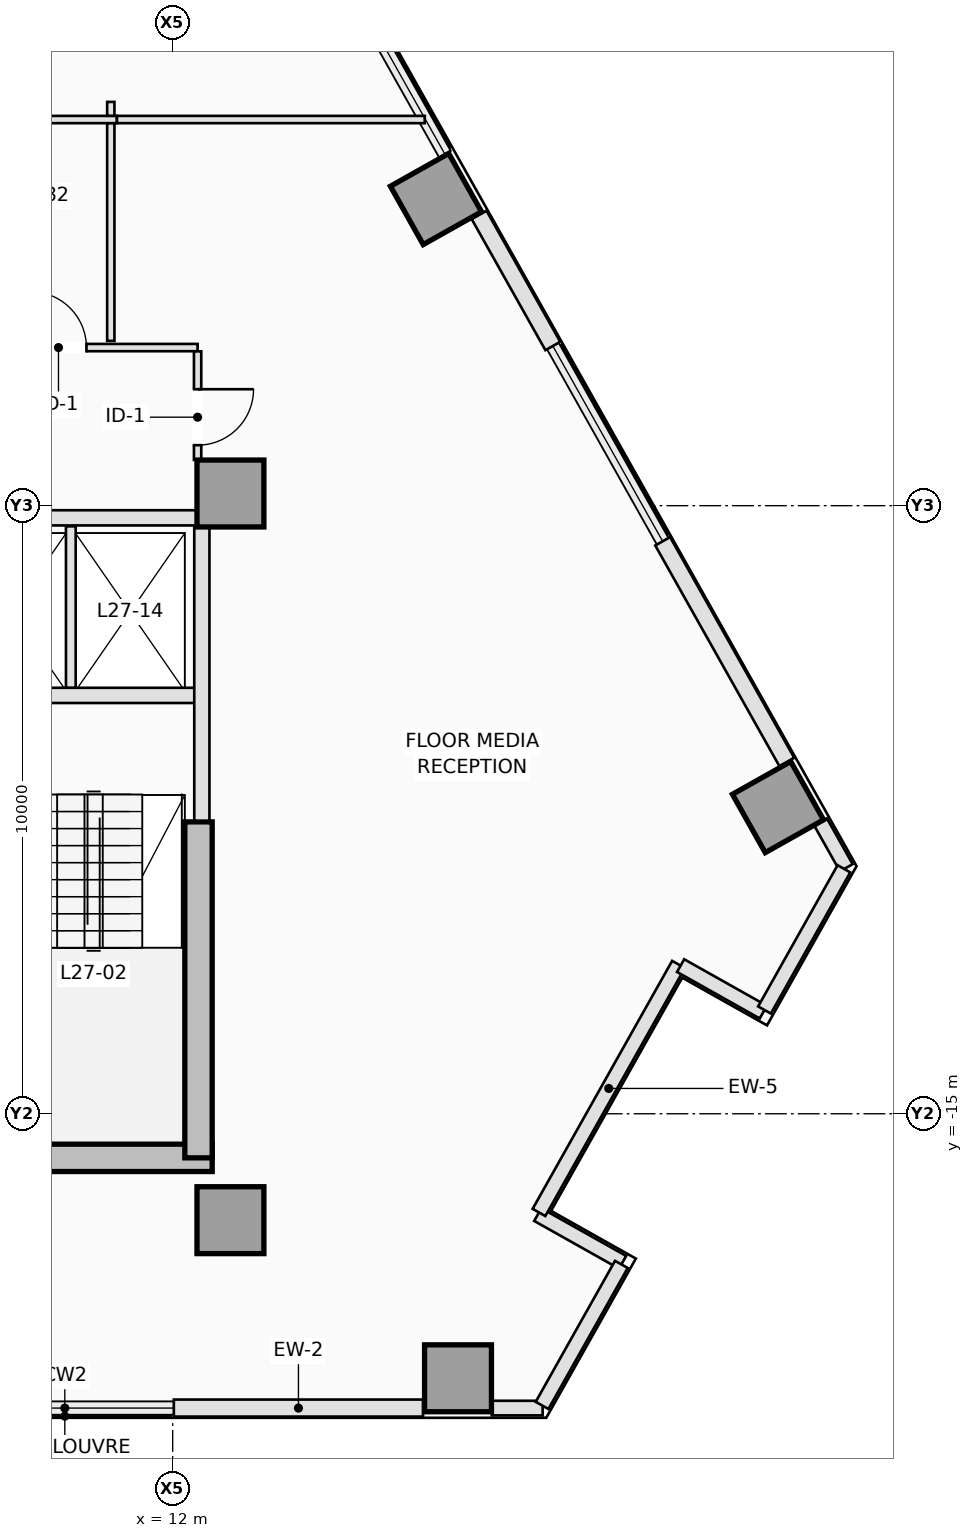
"""IFC4 building model, lengths in metres.
Left out: names, types, materials, properties, quantities, classifications, styles, units other than length and angle.
Written with IfcOpenShell. Run it as: python <this file> out.ifc"""

import sys

from ifc_helpers import new_model, si_unit, direction, frame, frame_2d, origin, origin_2d, place, context, subcontext, project, spatial, rectangle, extrude, element, fill, save


model = new_model("IFC4")
c1 = context("Model", 3, precision=1e-05, world=origin(), true_north=direction((0.0, 1.0)))
c2 = subcontext(c1, "Body", "Model", "MODEL_VIEW")
j1 = project(units=[si_unit("LENGTHUNIT", "METRE"), si_unit("PLANEANGLEUNIT", "RADIAN")], contexts=[c1])
p1 = place(None, origin())
s1 = spatial("IfcSite", under=j1, at=p1, CompositionType="ELEMENT")
p2 = place(p1, origin())
s2 = spatial("IfcBuilding", under=s1, at=p2, CompositionType="ELEMENT")
p3 = place(p2, frame((0.0, 0.0, 102.0)))
s3 = spatial("IfcBuildingStorey", under=s2, at=p3, CompositionType="ELEMENT", Elevation=102.0)
p4 = place(p3, frame((8.75, -15.725, 0.0), z_axis=(0.0, 0.0, 1.0), x_axis=(1.0, 0.0, 0.0)))
e1 = element("IfcWall", 1, at=p4, inside=s3, PredefinedType="SHEAR", context=c2, shape_type="SweptSolid", body=[
    extrude(rectangle(XDim=3.9, YDim=0.45, at=frame_2d((1.95, 0.0))), origin(), (0.0, 0.0, 1.0), 3.5),
])
p5 = place(p3, frame((12.425, -15.725, 0.0), z_axis=(0.0, 0.0, 1.0), x_axis=(0.0, 1.0, 0.0)))
e2 = element("IfcWall", 2, at=p5, inside=s3, PredefinedType="SHEAR", context=c2, shape_type="SweptSolid", body=[
    extrude(rectangle(XDim=5.525, YDim=0.45, at=frame_2d((2.763, 0.0))), origin(), (0.0, 0.0, 1.0), 3.5),
])
for number, where, z_axis, x_axis in (
    (3, (12.95, -16.75, 0.0), (0.0, 0.0, 1.0), (1.0, 0.0, 0.0)),
    (4, (12.95, -4.8, 0.0), (0.0, 0.0, 1.0), (1.0, 0.0, 0.0)),
    (5, (16.692, -19.35, 0.0), (0.0, 0.0, 1.0), (0.0, 1.0, 0.0)),
    (6, (21.955, -9.957, 0.0), (0.0, 0.0, 1.0), (0.872, 0.49, 0.0)),
    (7, (16.33, 0.043, 0.0), (0.0, 0.0, 1.0), (0.872, 0.49, 0.0)),
):
    element("IfcColumn", number, at=place(p3, frame(where, z_axis=z_axis, x_axis=x_axis)), inside=s3, PredefinedType="COLUMN", context=c2, shape_type="SweptSolid", body=[
        extrude(rectangle(XDim=1.1, YDim=1.1, at=origin_2d()), origin(), (0.0, 0.0, 1.0), 3.5),
    ])
p6 = place(p3, frame((18.084, -19.84, 0.0), z_axis=(0.0, 0.0, 1.0), x_axis=(-1.0, 0.0, 0.0)))
e8 = element("IfcWall", 8, at=p6, inside=s3, PredefinedType="STANDARD", context=c2, shape_type="SweptSolid", body=[
    extrude(rectangle(XDim=0.836, YDim=0.24, at=frame_2d((0.418, 0.0))), origin(), (0.0, 0.0, 1.0), 3.25),
])
p7 = place(p3, frame((16.117, -19.84, 0.0), z_axis=(0.0, 0.0, 1.0), x_axis=(-1.0, 0.0, 0.0)))
e9 = element("IfcWall", 9, at=p7, inside=s3, PredefinedType="STANDARD", context=c2, shape_type="SweptSolid", body=[
    extrude(rectangle(XDim=4.098, YDim=0.28, at=frame_2d((2.049, 0.0))), origin(), (0.0, 0.0, 1.0), 3.25),
])
p8 = place(p3, frame((22.654, -10.2, 0.0), z_axis=(0.0, 0.0, 1.0), x_axis=(0.490355003566, -0.871522788272, 0.0)))
e10 = element("IfcWall", 10, at=p8, inside=s3, PredefinedType="STANDARD", context=c2, shape_type="SweptSolid", body=[
    extrude(rectangle(XDim=0.865, YDim=0.24, at=frame_2d((0.433, 0.0))), origin(), (0.0, 0.0, 1.0), 3.25),
])
p9 = place(p3, frame((17.039, -0.218, 0.0), z_axis=(0.0, 0.0, 1.0), x_axis=(0.490186269625, -0.871617703509, 0.0)))
e11 = element("IfcWall", 11, at=p9, inside=s3, PredefinedType="STANDARD", context=c2, shape_type="SweptSolid", body=[
    extrude(rectangle(XDim=2.474, YDim=0.28, at=frame_2d((1.237, 0.0))), origin(), (0.0, 0.0, 1.0), 3.25),
])
p10 = place(p3, frame((20.058, -5.586, 0.0), z_axis=(0.0, 0.0, 1.0), x_axis=(0.490255672477, -0.871578668626, 0.0)))
e12 = element("IfcWall", 12, at=p10, inside=s3, PredefinedType="STANDARD", context=c2, shape_type="SweptSolid", body=[
    extrude(rectangle(XDim=4.164, YDim=0.28, at=frame_2d((2.082, 0.0))), origin(), (0.0, 0.0, 1.0), 3.25),
])
p11 = place(p3, frame((19.399, -17.442, 0.0), z_axis=(0.0, 0.0, 1.0), x_axis=(-0.871575537125, 0.490261239633, 0.0)))
e13 = element("IfcWall", 13, at=p11, inside=s3, PredefinedType="STANDARD", context=c2, shape_type="SweptSolid", body=[
    extrude(rectangle(XDim=1.6, YDim=0.24, at=frame_2d((0.8, 0.0))), origin(), (0.0, 0.0, 1.0), 3.25),
])
p12 = place(p3, frame((18.024, -16.623, 0.0), z_axis=(0.0, 0.0, 1.0), x_axis=(0.490273623647, 0.871568571001, 0.0)))
e14 = element("IfcWall", 14, at=p12, inside=s3, PredefinedType="STANDARD", context=c2, shape_type="SweptSolid", body=[
    extrude(rectangle(XDim=4.68, YDim=0.24, at=frame_2d((2.34, 0.0))), origin(), (0.0, 0.0, 1.0), 2.722),
])
p13 = place(p3, frame((20.354, -12.564, 0.0), z_axis=(0.0, 0.0, 1.0), x_axis=(0.871546278971, -0.490313250496, 0.0)))
e15 = element("IfcWall", 15, at=p13, inside=s3, PredefinedType="STANDARD", context=c2, shape_type="SweptSolid", body=[
    extrude(rectangle(XDim=1.56, YDim=0.24, at=frame_2d((0.78, 0.0))), origin(), (0.0, 0.0, 1.0), 3.25),
])
p14 = place(p3, frame((21.733, -13.294, 0.0), z_axis=(0.0, 0.0, 1.0), x_axis=(0.490265590412, 0.871573089797, 0.0)))
e16 = element("IfcWall", 16, at=p14, inside=s3, PredefinedType="STANDARD", context=c2, shape_type="SweptSolid", body=[
    extrude(rectangle(XDim=2.664, YDim=0.24, at=frame_2d((1.332, 0.0))), origin(), (0.0, 0.0, 1.0), 3.25),
])
p15 = place(p3, frame((18.075, -19.796, 0.0), z_axis=(0.0, 0.0, 1.0), x_axis=(0.490248170584, 0.871582888335, 0.0)))
e17 = element("IfcWall", 17, at=p15, inside=s3, PredefinedType="STANDARD", context=c2, shape_type="SweptSolid", body=[
    extrude(rectangle(XDim=2.661, YDim=0.24, at=frame_2d((1.331, 0.0))), origin(), (0.0, 0.0, 1.0), 3.25),
])
p16 = place(p3, frame((9.16, -8.12, 0.0), z_axis=(0.0, 0.0, 1.0), x_axis=(1.0, 0.0, 0.0)))
e18 = element("IfcWall", 18, at=p16, inside=s3, PredefinedType="PARTITIONING", context=c2, shape_type="SweptSolid", body=[
    extrude(rectangle(XDim=3.22, YDim=0.25, at=frame_2d((1.61, 0.0))), origin(), (0.0, 0.0, 1.0), 3.25),
])
p17 = place(p3, frame((12.48, -10.18, 0.0), z_axis=(0.0, 0.0, 1.0), x_axis=(0.0, 1.0, 0.0)))
e19 = element("IfcWall", 19, at=p17, inside=s3, PredefinedType="PARTITIONING", context=c2, shape_type="SweptSolid", body=[
    extrude(rectangle(XDim=4.828, YDim=0.25, at=frame_2d((2.414, 0.0))), origin(), (0.0, 0.0, 1.0), 3.25),
])
p18 = place(p3, frame((4.302, -5.2, 0.0), z_axis=(0.0, 0.0, 1.0), x_axis=(1.0, 0.0, 0.0)))
e20 = element("IfcWall", 20, at=p18, inside=s3, PredefinedType="PARTITIONING", context=c2, shape_type="SweptSolid", body=[
    extrude(rectangle(XDim=8.096, YDim=0.25, at=frame_2d((4.048, 0.0))), origin(), (0.0, 0.0, 1.0), 3.25),
])
p19 = place(p3, frame((10.325, -7.993, 0.0), z_axis=(0.0, 0.0, 1.0), x_axis=(0.0, 1.0, 0.0)))
e21 = element("IfcWall", 21, at=p19, inside=s3, PredefinedType="PARTITIONING", context=c2, shape_type="SweptSolid", body=[
    extrude(rectangle(XDim=2.653, YDim=0.16, at=frame_2d((1.326, 0.0))), origin(), (0.0, 0.0, 1.0), 3.25),
])
p20 = place(p3, frame((6.562, -2.4, 0.0), z_axis=(0.0, 0.0, 1.0), x_axis=(1.0, 0.0, 0.0)))
e22 = element("IfcWall", 22, at=p20, inside=s3, PredefinedType="PARTITIONING", context=c2, shape_type="SweptSolid", body=[
    extrude(rectangle(XDim=5.848, YDim=0.12, at=frame_2d((2.924, 0.0))), origin(), (0.0, 0.0, 1.0), 3.25),
])
p21 = place(p20, frame((3.1, 0.0, 0.0)))
e23 = element("IfcOpeningElement", 23, at=p21, cuts=e22, PredefinedType="OPENING", context=c2, shape_type="SweptSolid", body=[
    extrude(rectangle(XDim=0.92, YDim=2.12, at=frame_2d((0.46, 1.06))), frame((0.0, 0.07, 0.0), z_axis=(0.0, -1.0, 0.0), x_axis=(1.0, 0.0, 0.0)), (0.0, 0.0, 1.0), 0.14),
])
p22 = place(p3, frame((12.41, -2.462, 0.0), z_axis=(0.0, 0.0, 1.0), x_axis=(0.0, -1.0, 0.0)))
e24 = element("IfcWall", 24, at=p22, inside=s3, PredefinedType="PARTITIONING", context=c2, shape_type="SweptSolid", body=[
    extrude(rectangle(XDim=1.786, YDim=0.12, at=frame_2d((0.893, 0.0))), origin(), (0.0, 0.0, 1.0), 3.25),
])
p23 = place(p22, frame((0.623, 0.0, 0.0)))
e25 = element("IfcOpeningElement", 25, at=p23, cuts=e24, PredefinedType="OPENING", context=c2, shape_type="SweptSolid", body=[
    extrude(rectangle(XDim=0.92, YDim=2.12, at=frame_2d((0.46, 1.06))), frame((0.0, 0.07, 0.0), z_axis=(0.0, -1.0, 0.0), x_axis=(1.0, 0.0, 0.0)), (0.0, 0.0, 1.0), 0.14),
])
p24 = place(p3, frame((11.083, 1.35, 0.0), z_axis=(0.0, 0.0, 1.0), x_axis=(-1.0, 0.0, 0.0)))
e26 = element("IfcWall", 26, at=p24, inside=s3, PredefinedType="PARTITIONING", context=c2, shape_type="SweptSolid", body=[
    extrude(rectangle(XDim=1.92, YDim=0.12, at=frame_2d((0.96, 0.0))), origin(), (0.0, 0.0, 1.0), 3.25),
])
p25 = place(p3, frame((16.146, 1.35, 0.0), z_axis=(0.0, 0.0, 1.0), x_axis=(-1.0, 0.0, 0.0)))
e27 = element("IfcWall", 27, at=p25, inside=s3, PredefinedType="PARTITIONING", context=c2, shape_type="SweptSolid", body=[
    extrude(rectangle(XDim=5.061, YDim=0.12, at=frame_2d((2.531, 0.0))), origin(), (0.0, 0.0, 1.0), 3.25),
])
p26 = place(p3, frame((10.982, 1.64, 0.0), z_axis=(0.0, 0.0, 1.0), x_axis=(0.0, -1.0, 0.0)))
e28 = element("IfcWall", 28, at=p26, inside=s3, PredefinedType="PARTITIONING", context=c2, shape_type="SweptSolid", body=[
    extrude(rectangle(XDim=0.228, YDim=0.12, at=frame_2d((0.114, 0.0))), origin(), (0.0, 0.0, 1.0), 3.25),
])
p27 = place(p3, frame((10.982, 1.288, 0.0), z_axis=(0.0, 0.0, 1.0), x_axis=(0.0, -1.0, 0.0)))
e29 = element("IfcWall", 29, at=p27, inside=s3, PredefinedType="PARTITIONING", context=c2, shape_type="SweptSolid", body=[
    extrude(rectangle(XDim=3.578, YDim=0.12, at=frame_2d((1.789, 0.0))), origin(), (0.0, 0.0, 1.0), 3.25),
])
p28 = place(p21, origin())
e30 = element("IfcDoor", 30, at=p28, inside=s3, OperationType="SINGLE_SWING_LEFT", PredefinedType="DOOR", context=c2, shape_type="SweptSolid", body=[
    extrude(rectangle(XDim=0.92, YDim=2.12, at=frame_2d((0.46, 1.06))), frame((0.0, 0.025, 0.0), z_axis=(0.0, -1.0, 0.0), x_axis=(1.0, 0.0, 0.0)), (0.0, 0.0, 1.0), 0.05),
])
fill(e23, e30)
p29 = place(p23, origin())
e31 = element("IfcDoor", 31, at=p29, inside=s3, OperationType="SINGLE_SWING_LEFT", PredefinedType="DOOR", context=c2, shape_type="SweptSolid", body=[
    extrude(rectangle(XDim=0.92, YDim=2.12, at=frame_2d((0.46, 1.06))), frame((0.0, 0.025, 0.0), z_axis=(0.0, -1.0, 0.0), x_axis=(1.0, 0.0, 0.0)), (0.0, 0.0, 1.0), 0.05),
])
fill(e25, e31)
save(model, sys.argv[1])
